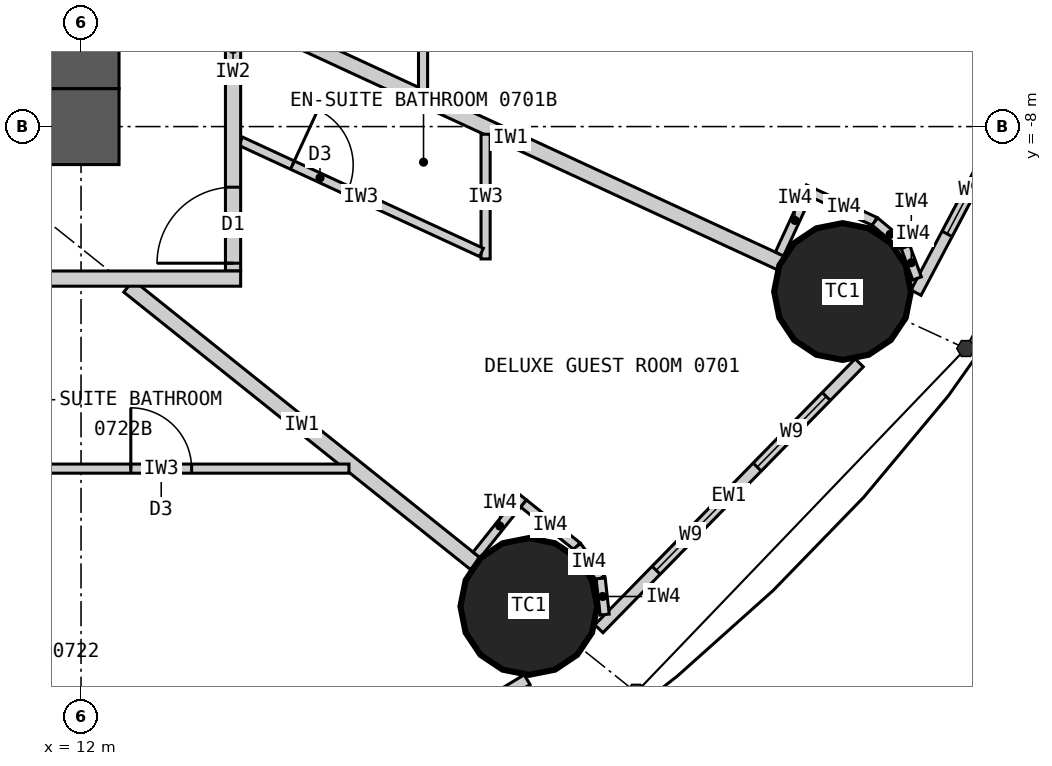
"""IFC4 building model, lengths in metres.
Left out: names, types, materials, properties, quantities, classifications, styles, units other than length and angle.
Written with IfcOpenShell. Run it as: python <this file> out.ifc"""

import sys

from ifc_helpers import new_model, si_unit, direction, frame, frame_2d, origin, origin_2d, place, context, subcontext, project, spatial, rectangle, circle, extrude, element, fill, save


model = new_model("IFC4")
c1 = context("Model", 3, precision=1e-05, world=origin(), true_north=direction((0.0, 1.0)))
c2 = subcontext(c1, "Body", "Model", "MODEL_VIEW")
j1 = project(units=[si_unit("LENGTHUNIT", "METRE"), si_unit("PLANEANGLEUNIT", "RADIAN")], contexts=[c1])
p1 = place(None, origin())
s1 = spatial("IfcSite", under=j1, at=p1, CompositionType="ELEMENT")
p2 = place(p1, origin())
s2 = spatial("IfcBuilding", under=s1, at=p2, CompositionType="ELEMENT")
p3 = place(p2, frame((0.0, 0.0, 36.0)))
s3 = spatial("IfcBuildingStorey", under=s2, at=p3, CompositionType="ELEMENT", Elevation=36.0)
for number, where, z_axis, x_axis in (
    (1, (17.892, -14.313, 0.0), (0.0, 0.0, 1.0), (1.0, 0.0, 0.0)),
    (2, (22.019, -10.17, 0.0), (0.0, 0.0, 1.0), (1.0, 0.0, 0.0)),
):
    element("IfcColumn", number, at=place(p3, frame(where, z_axis=z_axis, x_axis=x_axis)), inside=s3, PredefinedType="COLUMN", context=c2, shape_type="SweptSolid", body=[
        extrude(circle(Radius=0.9, at=origin_2d()), origin(), (0.0, 0.0, 1.0), 3.3),
    ])
p4 = place(p3, frame((12.5, -8.0, 0.0), z_axis=(0.0, 0.0, 1.0), x_axis=(-1.0, 0.0, 0.0)))
e3 = element("IfcWall", 3, at=p4, inside=s3, PredefinedType="SHEAR", context=c2, shape_type="SweptSolid", body=[
    extrude(rectangle(XDim=25.0, YDim=1.0, at=frame_2d((12.5, 0.0))), origin(), (0.0, 0.0, 1.0), 3.3),
])
p5 = place(p4, frame((11.2, 0.0, 0.0)))
e4 = element("IfcOpeningElement", 4, at=p5, cuts=e3, PredefinedType="OPENING", context=c2, shape_type="SweptSolid", body=[
    extrude(rectangle(XDim=1.2, YDim=2.2, at=frame_2d((0.6, 1.1))), frame((0.0, 0.51, 0.0), z_axis=(0.0, -1.0, 0.0), x_axis=(1.0, 0.0, 0.0)), (0.0, 0.0, 1.0), 1.02),
])
p6 = place(p4, frame((18.8, 0.0, 0.0)))
e5 = element("IfcOpeningElement", 5, at=p6, cuts=e3, PredefinedType="OPENING", context=c2, shape_type="SweptSolid", body=[
    extrude(rectangle(XDim=0.9, YDim=2.2, at=frame_2d((0.45, 1.1))), frame((0.0, 0.51, 0.0), z_axis=(0.0, -1.0, 0.0), x_axis=(1.0, 0.0, 0.0)), (0.0, 0.0, 1.0), 1.02),
])
p7 = place(p3, frame((12.0, -7.5, 0.0), z_axis=(0.0, 0.0, 1.0), x_axis=(0.0, 1.0, 0.0)))
e6 = element("IfcWall", 6, at=p7, inside=s3, PredefinedType="SHEAR", context=c2, shape_type="SweptSolid", body=[
    extrude(rectangle(XDim=15.0, YDim=1.0, at=frame_2d((7.5, 0.0))), origin(), (0.0, 0.0, 1.0), 3.3),
])
p8 = place(p7, frame((6.6, 0.0, 0.0)))
e7 = element("IfcOpeningElement", 7, at=p8, cuts=e6, PredefinedType="OPENING", context=c2, shape_type="SweptSolid", body=[
    extrude(rectangle(XDim=1.8, YDim=2.2, at=frame_2d((0.9, 1.1))), frame((0.0, 0.51, 0.0), z_axis=(0.0, -1.0, 0.0), x_axis=(1.0, 0.0, 0.0)), (0.0, 0.0, 1.0), 1.02),
])
p9 = place(p3, frame((13.412, -17.957, 0.0), z_axis=(0.0, 0.0, 1.0), x_axis=(0.856958191554, 0.515385931054, 0.0)))
e8 = element("IfcWall", 8, at=p9, inside=s3, PredefinedType="ELEMENTEDWALL", context=c2, shape_type="SweptSolid", body=[
    extrude(rectangle(XDim=5.201, YDim=0.15, at=frame_2d((2.601, 0.0))), origin(), (0.0, 0.0, 1.0), 3.12),
])
p10 = place(p9, frame((1.225, 0.0, 0.9)))
e9 = element("IfcOpeningElement", 9, at=p10, cuts=e8, PredefinedType="OPENING", context=c2, shape_type="SweptSolid", body=[
    extrude(rectangle(XDim=1.3, YDim=1.9, at=frame_2d((0.65, 0.95))), frame((0.0, 0.085, 0.0), z_axis=(0.0, -1.0, 0.0), x_axis=(1.0, 0.0, 0.0)), (0.0, 0.0, 1.0), 0.17),
])
p11 = place(p9, frame((3.125, 0.0, 0.9)))
e10 = element("IfcOpeningElement", 10, at=p11, cuts=e8, PredefinedType="OPENING", context=c2, shape_type="SweptSolid", body=[
    extrude(rectangle(XDim=1.3, YDim=1.9, at=frame_2d((0.65, 0.95))), frame((0.0, 0.085, 0.0), z_axis=(0.0, -1.0, 0.0), x_axis=(1.0, 0.0, 0.0)), (0.0, 0.0, 1.0), 0.17),
])
p12 = place(p3, frame((18.813, -14.607, 0.0), z_axis=(0.0, 0.0, 1.0), x_axis=(0.699612594083, 0.714522370679, 0.0)))
e11 = element("IfcWall", 11, at=p12, inside=s3, PredefinedType="ELEMENTEDWALL", context=c2, shape_type="SweptSolid", body=[
    extrude(rectangle(XDim=4.896, YDim=0.15, at=frame_2d((2.448, 0.0))), origin(), (0.0, 0.0, 1.0), 3.12),
])
p13 = place(p12, frame((1.077, 0.0, 0.9)))
e12 = element("IfcOpeningElement", 12, at=p13, cuts=e11, PredefinedType="OPENING", context=c2, shape_type="SweptSolid", body=[
    extrude(rectangle(XDim=1.3, YDim=1.9, at=frame_2d((0.65, 0.95))), frame((0.0, 0.085, 0.0), z_axis=(0.0, -1.0, 0.0), x_axis=(1.0, 0.0, 0.0)), (0.0, 0.0, 1.0), 0.17),
])
p14 = place(p12, frame((2.977, 0.0, 0.9)))
e13 = element("IfcOpeningElement", 13, at=p14, cuts=e11, PredefinedType="OPENING", context=c2, shape_type="SweptSolid", body=[
    extrude(rectangle(XDim=1.3, YDim=1.9, at=frame_2d((0.65, 0.95))), frame((0.0, 0.085, 0.0), z_axis=(0.0, -1.0, 0.0), x_axis=(1.0, 0.0, 0.0)), (0.0, 0.0, 1.0), 0.17),
])
p15 = place(p3, frame((22.986, -10.185, 0.0), z_axis=(0.0, 0.0, 1.0), x_axis=(0.467303182954, 0.884097129959, 0.0)))
e14 = element("IfcWall", 14, at=p15, inside=s3, PredefinedType="ELEMENTEDWALL", context=c2, shape_type="SweptSolid", body=[
    extrude(rectangle(XDim=4.606, YDim=0.15, at=frame_2d((2.303, 0.0))), origin(), (0.0, 0.0, 1.0), 3.12),
])
p16 = place(p15, frame((0.875, 0.0, 0.9)))
e15 = element("IfcOpeningElement", 15, at=p16, cuts=e14, PredefinedType="OPENING", context=c2, shape_type="SweptSolid", body=[
    extrude(rectangle(XDim=1.3, YDim=1.9, at=frame_2d((0.65, 0.95))), frame((0.0, 0.085, 0.0), z_axis=(0.0, -1.0, 0.0), x_axis=(1.0, 0.0, 0.0)), (0.0, 0.0, 1.0), 0.17),
])
p17 = place(p15, frame((2.775, 0.0, 0.9)))
e16 = element("IfcOpeningElement", 16, at=p17, cuts=e14, PredefinedType="OPENING", context=c2, shape_type="SweptSolid", body=[
    extrude(rectangle(XDim=1.3, YDim=1.9, at=frame_2d((0.65, 0.95))), frame((0.0, 0.085, 0.0), z_axis=(0.0, -1.0, 0.0), x_axis=(1.0, 0.0, 0.0)), (0.0, 0.0, 1.0), 0.17),
])
p18 = place(p3, frame((12.625, -10.1, 0.0), z_axis=(0.0, 0.0, 1.0), x_axis=(0.780872884676, -0.624689953479, 0.0)))
e17 = element("IfcWall", 17, at=p18, inside=s3, PredefinedType="PARTITIONING", context=c2, shape_type="SweptSolid", body=[
    extrude(rectangle(XDim=5.845, YDim=0.2, at=frame_2d((2.922, 0.0))), origin(), (0.0, 0.0, 1.0), 2.32),
])
p19 = place(p3, frame((14.1, -6.512, 0.0), z_axis=(0.0, 0.0, 1.0), x_axis=(0.907842433118, -0.41931147925, 0.0)))
e18 = element("IfcWall", 18, at=p19, inside=s3, PredefinedType="PARTITIONING", context=c2, shape_type="SweptSolid", body=[
    extrude(rectangle(XDim=7.823, YDim=0.2, at=frame_2d((3.912, 0.0))), origin(), (0.0, 0.0, 1.0), 2.32),
])
p20 = place(p3, frame((17.323, -8.101, 0.0), z_axis=(0.0, 0.0, 1.0), x_axis=(0.0, -1.0, 0.0)))
e19 = element("IfcWall", 19, at=p20, inside=s3, PredefinedType="PARTITIONING", context=c2, shape_type="SweptSolid", body=[
    extrude(rectangle(XDim=1.64, YDim=0.12, at=frame_2d((0.82, 0.0))), origin(), (0.0, 0.0, 1.0), 3.12),
])
p21 = place(p3, frame((14.1, -8.193, 0.0), z_axis=(0.0, 0.0, 1.0), x_axis=(0.907836493557, -0.419324338628, 0.0)))
e20 = element("IfcWall", 20, at=p21, inside=s3, PredefinedType="PARTITIONING", context=c2, shape_type="SweptSolid", body=[
    extrude(rectangle(XDim=3.49, YDim=0.12, at=frame_2d((1.745, 0.0))), origin(), (0.0, 0.0, 1.0), 3.12),
])
p22 = place(p21, frame((0.75, 0.0, 0.0)))
e21 = element("IfcOpeningElement", 21, at=p22, cuts=e20, PredefinedType="OPENING", context=c2, shape_type="SweptSolid", body=[
    extrude(rectangle(XDim=0.8, YDim=2.1, at=frame_2d((0.4, 1.05))), frame((0.0, 0.07, 0.0), z_axis=(0.0, -1.0, 0.0), x_axis=(1.0, 0.0, 0.0)), (0.0, 0.0, 1.0), 0.14),
])
p23 = place(p3, frame((16.5, -7.521, 0.0), z_axis=(0.0, 0.0, 1.0), x_axis=(0.0, 1.0, 0.0)))
e22 = element("IfcWall", 22, at=p23, inside=s3, PredefinedType="PARTITIONING", context=c2, shape_type="SweptSolid", body=[
    extrude(rectangle(XDim=3.448, YDim=0.12, at=frame_2d((1.724, 0.0))), origin(), (0.0, 0.0, 1.0), 3.12),
])
p24 = place(p3, frame((15.525, -12.5, 0.0), z_axis=(0.0, 0.0, 1.0), x_axis=(-1.0, 0.0, 0.0)))
e23 = element("IfcWall", 23, at=p24, inside=s3, PredefinedType="PARTITIONING", context=c2, shape_type="SweptSolid", body=[
    extrude(rectangle(XDim=4.94, YDim=0.12, at=frame_2d((2.47, 0.0))), origin(), (0.0, 0.0, 1.0), 3.12),
])
p25 = place(p24, frame((2.07, 0.0, 0.0)))
e24 = element("IfcOpeningElement", 24, at=p25, cuts=e23, PredefinedType="OPENING", context=c2, shape_type="SweptSolid", body=[
    extrude(rectangle(XDim=0.8, YDim=2.1, at=frame_2d((0.4, 1.05))), frame((0.0, 0.07, 0.0), z_axis=(0.0, -1.0, 0.0), x_axis=(1.0, 0.0, 0.0)), (0.0, 0.0, 1.0), 0.14),
])
p26 = place(p3, frame((14.0, -9.9, 0.0), z_axis=(0.0, 0.0, 1.0), x_axis=(0.0, 1.0, 0.0)))
e25 = element("IfcWall", 25, at=p26, inside=s3, PredefinedType="PARTITIONING", context=c2, shape_type="SweptSolid", body=[
    extrude(rectangle(XDim=5.827, YDim=0.2, at=frame_2d((2.914, 0.0))), origin(), (0.0, 0.0, 1.0), 3.12),
])
p27 = place(p26, frame((0.103, 0.0, 0.0)))
e26 = element("IfcOpeningElement", 26, at=p27, cuts=e25, PredefinedType="OPENING", context=c2, shape_type="SweptSolid", body=[
    extrude(rectangle(XDim=1.0, YDim=2.2, at=frame_2d((0.5, 1.1))), frame((0.0, 0.11, 0.0), z_axis=(0.0, -1.0, 0.0), x_axis=(1.0, 0.0, 0.0)), (0.0, 0.0, 1.0), 0.22),
])
p28 = place(p3, frame((14.1, -10.0, 0.0), z_axis=(0.0, 0.0, 1.0), x_axis=(-1.0, 0.0, 0.0)))
e27 = element("IfcWall", 27, at=p28, inside=s3, PredefinedType="PARTITIONING", context=c2, shape_type="SweptSolid", body=[
    extrude(rectangle(XDim=9.205, YDim=0.2, at=frame_2d((4.603, 0.0))), origin(), (0.0, 0.0, 1.0), 3.12),
])
p29 = place(p28, frame((4.755, 0.0, 0.0)))
e28 = element("IfcOpeningElement", 28, at=p29, cuts=e27, PredefinedType="OPENING", context=c2, shape_type="SweptSolid", body=[
    extrude(rectangle(XDim=1.0, YDim=2.2, at=frame_2d((0.5, 1.1))), frame((0.0, 0.11, 0.0), z_axis=(0.0, -1.0, 0.0), x_axis=(1.0, 0.0, 0.0)), (0.0, 0.0, 1.0), 0.22),
])
p30 = place(p3, frame((17.205, -13.635, 0.0), z_axis=(0.0, 0.0, 1.0), x_axis=(0.624756144097, 0.780819928289, 0.0)))
e29 = element("IfcWall", 29, at=p30, inside=s3, PredefinedType="PARTITIONING", context=c2, shape_type="SweptSolid", body=[
    extrude(rectangle(XDim=0.975, YDim=0.12, at=frame_2d((0.487, 0.0))), origin(), (0.0, 0.0, 1.0), 3.12),
])
p31 = place(p3, frame((17.823, -12.959, 0.0), z_axis=(0.0, 0.0, 1.0), x_axis=(0.780895271023, -0.624661969144, 0.0)))
e30 = element("IfcWall", 30, at=p31, inside=s3, PredefinedType="PARTITIONING", context=c2, shape_type="SweptSolid", body=[
    extrude(rectangle(XDim=0.9, YDim=0.12, at=frame_2d((0.45, 0.0))), origin(), (0.0, 0.0, 1.0), 3.12),
])
p32 = place(p3, frame((18.526, -13.521, 0.0), z_axis=(0.0, 0.0, 1.0), x_axis=(0.592532503205, -0.805546542818, 0.0)))
e31 = element("IfcWall", 31, at=p32, inside=s3, PredefinedType="PARTITIONING", context=c2, shape_type="SweptSolid", body=[
    extrude(rectangle(XDim=0.525, YDim=0.12, at=frame_2d((0.262, 0.0))), origin(), (0.0, 0.0, 1.0), 3.12),
])
p33 = place(p3, frame((18.837, -13.944, 0.0), z_axis=(0.0, 0.0, 1.0), x_axis=(0.110543348478, -0.993871303594, 0.0)))
e32 = element("IfcWall", 32, at=p33, inside=s3, PredefinedType="PARTITIONING", context=c2, shape_type="SweptSolid", body=[
    extrude(rectangle(XDim=0.479, YDim=0.12, at=frame_2d((0.24, 0.0))), origin(), (0.0, 0.0, 1.0), 3.12),
])
p34 = place(p3, frame((21.189, -9.677, 0.0), z_axis=(0.0, 0.0, 1.0), x_axis=(0.419344098106, 0.907827366509, 0.0)))
e33 = element("IfcWall", 33, at=p34, inside=s3, PredefinedType="PARTITIONING", context=c2, shape_type="SweptSolid", body=[
    extrude(rectangle(XDim=0.975, YDim=0.12, at=frame_2d((0.487, 0.0))), origin(), (0.0, 0.0, 1.0), 3.12),
])
p35 = place(p3, frame((21.627, -8.872, 0.0), z_axis=(0.0, 0.0, 1.0), x_axis=(0.907935564339, -0.419109783957, 0.0)))
e34 = element("IfcWall", 34, at=p35, inside=s3, PredefinedType="PARTITIONING", context=c2, shape_type="SweptSolid", body=[
    extrude(rectangle(XDim=0.9, YDim=0.12, at=frame_2d((0.45, 0.0))), origin(), (0.0, 0.0, 1.0), 3.12),
])
p36 = place(p3, frame((22.445, -9.249, 0.0), z_axis=(0.0, 0.0, 1.0), x_axis=(0.768335565584, -0.640047231584, 0.0)))
e35 = element("IfcWall", 35, at=p36, inside=s3, PredefinedType="PARTITIONING", context=c2, shape_type="SweptSolid", body=[
    extrude(rectangle(XDim=0.525, YDim=0.12, at=frame_2d((0.263, 0.0))), origin(), (0.0, 0.0, 1.0), 3.12),
])
p37 = place(p3, frame((22.848, -9.585, 0.0), z_axis=(0.0, 0.0, 1.0), x_axis=(0.345267312673, -0.938504386138, 0.0)))
e36 = element("IfcWall", 36, at=p37, inside=s3, PredefinedType="PARTITIONING", context=c2, shape_type="SweptSolid", body=[
    extrude(rectangle(XDim=0.439, YDim=0.12, at=frame_2d((0.22, 0.0))), origin(), (0.0, 0.0, 1.0), 3.12),
])
p38 = place(p13, origin())
e37 = element("IfcWindow", 37, at=p38, inside=s3, PartitioningType="SINGLE_PANEL", PredefinedType="WINDOW", context=c2, shape_type="SweptSolid", body=[
    extrude(rectangle(XDim=1.3, YDim=1.9, at=frame_2d((0.65, 0.95))), frame((0.0, 0.03, 0.0), z_axis=(0.0, -1.0, 0.0), x_axis=(1.0, 0.0, 0.0)), (0.0, 0.0, 1.0), 0.06),
])
fill(e12, e37)
p39 = place(p14, origin())
e38 = element("IfcWindow", 38, at=p39, inside=s3, PartitioningType="SINGLE_PANEL", PredefinedType="WINDOW", context=c2, shape_type="SweptSolid", body=[
    extrude(rectangle(XDim=1.3, YDim=1.9, at=frame_2d((0.65, 0.95))), frame((0.0, 0.03, 0.0), z_axis=(0.0, -1.0, 0.0), x_axis=(1.0, 0.0, 0.0)), (0.0, 0.0, 1.0), 0.06),
])
fill(e13, e38)
p40 = place(p16, origin())
e39 = element("IfcWindow", 39, at=p40, inside=s3, PartitioningType="SINGLE_PANEL", PredefinedType="WINDOW", context=c2, shape_type="SweptSolid", body=[
    extrude(rectangle(XDim=1.3, YDim=1.9, at=frame_2d((0.65, 0.95))), frame((0.0, 0.03, 0.0), z_axis=(0.0, -1.0, 0.0), x_axis=(1.0, 0.0, 0.0)), (0.0, 0.0, 1.0), 0.06),
])
fill(e15, e39)
p41 = place(p22, origin())
e40 = element("IfcDoor", 40, at=p41, inside=s3, OperationType="SINGLE_SWING_LEFT", PredefinedType="DOOR", context=c2, shape_type="SweptSolid", body=[
    extrude(rectangle(XDim=0.8, YDim=2.1, at=frame_2d((0.4, 1.05))), frame((0.0, 0.025, 0.0), z_axis=(0.0, -1.0, 0.0), x_axis=(1.0, 0.0, 0.0)), (0.0, 0.0, 1.0), 0.05),
])
fill(e21, e40)
p42 = place(p27, origin())
e41 = element("IfcDoor", 41, at=p42, inside=s3, OperationType="SINGLE_SWING_LEFT", PredefinedType="DOOR", context=c2, shape_type="SweptSolid", body=[
    extrude(rectangle(XDim=1.0, YDim=2.2, at=frame_2d((0.5, 1.1))), frame((0.0, 0.025, 0.0), z_axis=(0.0, -1.0, 0.0), x_axis=(1.0, 0.0, 0.0)), (0.0, 0.0, 1.0), 0.05),
])
fill(e26, e41)
p43 = place(p25, origin())
e42 = element("IfcDoor", 42, at=p43, inside=s3, OperationType="SINGLE_SWING_RIGHT", PredefinedType="DOOR", context=c2, shape_type="SweptSolid", body=[
    extrude(rectangle(XDim=0.8, YDim=2.1, at=frame_2d((0.4, 1.05))), frame((0.0, 0.025, 0.0), z_axis=(0.0, -1.0, 0.0), x_axis=(1.0, 0.0, 0.0)), (0.0, 0.0, 1.0), 0.05),
])
fill(e24, e42)
save(model, sys.argv[1])
